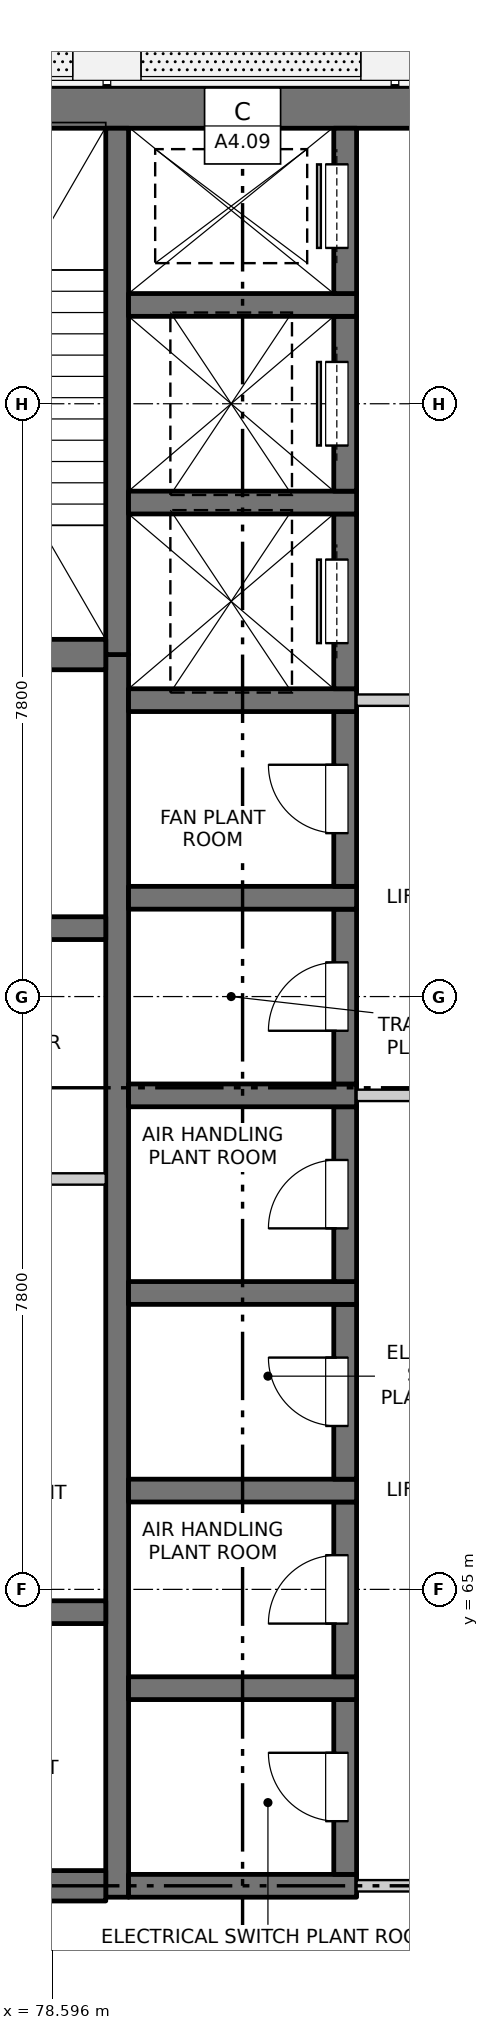
"""IFC4 building model, lengths in metres.
Left out: names, types, materials, properties, quantities, classifications, styles, units other than length and angle.
Written with IfcOpenShell. Run it as: python <this file> out.ifc"""

import sys

from ifc_helpers import new_model, si_unit, direction, frame, frame_2d, origin, place, context, subcontext, project, spatial, rectangle, extrude, element, fill, save


model = new_model("IFC4")
c1 = context("Model", 3, precision=1e-05, world=origin(), true_north=direction((0.0, 1.0)))
c2 = subcontext(c1, "Body", "Model", "MODEL_VIEW")
j1 = project(units=[si_unit("LENGTHUNIT", "METRE"), si_unit("PLANEANGLEUNIT", "RADIAN")], contexts=[c1])
p1 = place(None, origin())
s1 = spatial("IfcSite", under=j1, at=p1, CompositionType="ELEMENT")
p2 = place(p1, origin())
s2 = spatial("IfcBuilding", under=s1, at=p2, CompositionType="ELEMENT")
p3 = place(p2, frame((0.0, 0.0, 144.1)))
s3 = spatial("IfcBuildingStorey", under=s2, at=p3, CompositionType="ELEMENT", Elevation=144.1)
p4 = place(p3, frame((75.525, 84.5, -0.3), z_axis=(0.0, 0.0, 1.0), x_axis=(1.0, 0.0, 0.0)))
e1 = element("IfcWall", 1, at=p4, inside=s3, PredefinedType="SOLIDWALL", context=c2, shape_type="SweptSolid", body=[
    extrude(rectangle(XDim=18.95, YDim=0.55, at=frame_2d((9.475, 0.0))), origin(), (0.0, 0.0, 1.0), 4.5),
])
p5 = place(p3, frame((79.45, 60.95, -0.3), z_axis=(0.0, 0.0, 1.0), x_axis=(0.0, 1.0, 0.0)))
e2 = element("IfcWall", 2, at=p5, inside=s3, PredefinedType="SOLIDWALL", context=c2, shape_type="SweptSolid", body=[
    extrude(rectangle(XDim=16.35, YDim=0.3, at=frame_2d((8.175, 0.0))), origin(), (0.0, 0.0, 1.0), 4.5),
])
p6 = place(p3, frame((79.45, 77.3, -0.3), z_axis=(0.0, 0.0, 1.0), x_axis=(0.0, 1.0, 0.0)))
e3 = element("IfcWall", 3, at=p6, inside=s3, PredefinedType="SOLIDWALL", context=c2, shape_type="SweptSolid", body=[
    extrude(rectangle(XDim=6.925, YDim=0.3, at=frame_2d((3.462, 0.0))), origin(), (0.0, 0.0, 1.0), 4.5),
])
p7 = place(p3, frame((79.6, 61.1, -0.3), z_axis=(0.0, 0.0, 1.0), x_axis=(1.0, 0.0, 0.0)))
e4 = element("IfcWall", 4, at=p7, inside=s3, PredefinedType="SOLIDWALL", context=c2, shape_type="SweptSolid", body=[
    extrude(rectangle(XDim=3.0, YDim=0.3, at=frame_2d((1.5, 0.0))), origin(), (0.0, 0.0, 1.0), 4.5),
])
p8 = place(p3, frame((82.45, 61.25, -0.3), z_axis=(0.0, 0.0, 1.0), x_axis=(0.0, 1.0, 0.0)))
e5 = element("IfcWall", 5, at=p8, inside=s3, PredefinedType="SOLIDWALL", context=c2, shape_type="SweptSolid", body=[
    extrude(rectangle(XDim=2.3, YDim=0.3, at=frame_2d((1.15, 0.0))), origin(), (0.0, 0.0, 1.0), 4.5),
])
p9 = place(p8, frame((0.7, 0.0, 0.3)))
e6 = element("IfcOpeningElement", 6, at=p9, cuts=e5, PredefinedType="OPENING", context=c2, shape_type="SweptSolid", body=[
    extrude(rectangle(XDim=0.9, YDim=2.1, at=frame_2d((0.45, 1.05))), frame((0.0, 0.16, 0.0), z_axis=(0.0, -1.0, 0.0), x_axis=(1.0, 0.0, 0.0)), (0.0, 0.0, 1.0), 0.32),
])
p10 = place(p3, frame((79.6, 63.7, -0.3), z_axis=(0.0, 0.0, 1.0), x_axis=(1.0, 0.0, 0.0)))
e7 = element("IfcWall", 7, at=p10, inside=s3, PredefinedType="SOLIDWALL", context=c2, shape_type="SweptSolid", body=[
    extrude(rectangle(XDim=3.0, YDim=0.3, at=frame_2d((1.5, 0.0))), origin(), (0.0, 0.0, 1.0), 4.5),
])
p11 = place(p3, frame((82.45, 63.85, -0.3), z_axis=(0.0, 0.0, 1.0), x_axis=(0.0, 1.0, 0.0)))
e8 = element("IfcWall", 8, at=p11, inside=s3, PredefinedType="SOLIDWALL", context=c2, shape_type="SweptSolid", body=[
    extrude(rectangle(XDim=2.3, YDim=0.3, at=frame_2d((1.15, 0.0))), origin(), (0.0, 0.0, 1.0), 4.5),
])
p12 = place(p11, frame((0.7, 0.0, 0.3)))
e9 = element("IfcOpeningElement", 9, at=p12, cuts=e8, PredefinedType="OPENING", context=c2, shape_type="SweptSolid", body=[
    extrude(rectangle(XDim=0.9, YDim=2.1, at=frame_2d((0.45, 1.05))), frame((0.0, 0.16, 0.0), z_axis=(0.0, -1.0, 0.0), x_axis=(1.0, 0.0, 0.0)), (0.0, 0.0, 1.0), 0.32),
])
p13 = place(p3, frame((79.6, 66.3, -0.3), z_axis=(0.0, 0.0, 1.0), x_axis=(1.0, 0.0, 0.0)))
e10 = element("IfcWall", 10, at=p13, inside=s3, PredefinedType="SOLIDWALL", context=c2, shape_type="SweptSolid", body=[
    extrude(rectangle(XDim=3.0, YDim=0.3, at=frame_2d((1.5, 0.0))), origin(), (0.0, 0.0, 1.0), 4.5),
])
p14 = place(p3, frame((82.45, 66.45, -0.3), z_axis=(0.0, 0.0, 1.0), x_axis=(0.0, 1.0, 0.0)))
e11 = element("IfcWall", 11, at=p14, inside=s3, PredefinedType="SOLIDWALL", context=c2, shape_type="SweptSolid", body=[
    extrude(rectangle(XDim=2.3, YDim=0.3, at=frame_2d((1.15, 0.0))), origin(), (0.0, 0.0, 1.0), 4.5),
])
p15 = place(p14, frame((0.7, 0.0, 0.3)))
e12 = element("IfcOpeningElement", 12, at=p15, cuts=e11, PredefinedType="OPENING", context=c2, shape_type="SweptSolid", body=[
    extrude(rectangle(XDim=0.9, YDim=2.1, at=frame_2d((0.45, 1.05))), frame((0.0, 0.16, 0.0), z_axis=(0.0, -1.0, 0.0), x_axis=(1.0, 0.0, 0.0)), (0.0, 0.0, 1.0), 0.32),
])
p16 = place(p3, frame((79.6, 68.9, -0.3), z_axis=(0.0, 0.0, 1.0), x_axis=(1.0, 0.0, 0.0)))
e13 = element("IfcWall", 13, at=p16, inside=s3, PredefinedType="SOLIDWALL", context=c2, shape_type="SweptSolid", body=[
    extrude(rectangle(XDim=3.0, YDim=0.3, at=frame_2d((1.5, 0.0))), origin(), (0.0, 0.0, 1.0), 4.5),
])
p17 = place(p3, frame((82.45, 69.05, -0.3), z_axis=(0.0, 0.0, 1.0), x_axis=(0.0, 1.0, 0.0)))
e14 = element("IfcWall", 14, at=p17, inside=s3, PredefinedType="SOLIDWALL", context=c2, shape_type="SweptSolid", body=[
    extrude(rectangle(XDim=2.3, YDim=0.3, at=frame_2d((1.15, 0.0))), origin(), (0.0, 0.0, 1.0), 4.5),
])
p18 = place(p17, frame((0.7, 0.0, 0.3)))
e15 = element("IfcOpeningElement", 15, at=p18, cuts=e14, PredefinedType="OPENING", context=c2, shape_type="SweptSolid", body=[
    extrude(rectangle(XDim=0.9, YDim=2.1, at=frame_2d((0.45, 1.05))), frame((0.0, 0.16, 0.0), z_axis=(0.0, -1.0, 0.0), x_axis=(1.0, 0.0, 0.0)), (0.0, 0.0, 1.0), 0.32),
])
p19 = place(p3, frame((79.6, 71.5, -0.3), z_axis=(0.0, 0.0, 1.0), x_axis=(1.0, 0.0, 0.0)))
e16 = element("IfcWall", 16, at=p19, inside=s3, PredefinedType="SOLIDWALL", context=c2, shape_type="SweptSolid", body=[
    extrude(rectangle(XDim=3.0, YDim=0.3, at=frame_2d((1.5, 0.0))), origin(), (0.0, 0.0, 1.0), 4.5),
])
p20 = place(p3, frame((82.45, 71.65, -0.3), z_axis=(0.0, 0.0, 1.0), x_axis=(0.0, 1.0, 0.0)))
e17 = element("IfcWall", 17, at=p20, inside=s3, PredefinedType="SOLIDWALL", context=c2, shape_type="SweptSolid", body=[
    extrude(rectangle(XDim=2.3, YDim=0.3, at=frame_2d((1.15, 0.0))), origin(), (0.0, 0.0, 1.0), 4.5),
])
p21 = place(p20, frame((0.7, 0.0, 0.3)))
e18 = element("IfcOpeningElement", 18, at=p21, cuts=e17, PredefinedType="OPENING", context=c2, shape_type="SweptSolid", body=[
    extrude(rectangle(XDim=0.9, YDim=2.1, at=frame_2d((0.45, 1.05))), frame((0.0, 0.16, 0.0), z_axis=(0.0, -1.0, 0.0), x_axis=(1.0, 0.0, 0.0)), (0.0, 0.0, 1.0), 0.32),
])
p22 = place(p3, frame((79.6, 74.1, -0.3), z_axis=(0.0, 0.0, 1.0), x_axis=(1.0, 0.0, 0.0)))
e19 = element("IfcWall", 19, at=p22, inside=s3, PredefinedType="SOLIDWALL", context=c2, shape_type="SweptSolid", body=[
    extrude(rectangle(XDim=3.0, YDim=0.3, at=frame_2d((1.5, 0.0))), origin(), (0.0, 0.0, 1.0), 4.5),
])
p23 = place(p3, frame((82.45, 74.25, -0.3), z_axis=(0.0, 0.0, 1.0), x_axis=(0.0, 1.0, 0.0)))
e20 = element("IfcWall", 20, at=p23, inside=s3, PredefinedType="SOLIDWALL", context=c2, shape_type="SweptSolid", body=[
    extrude(rectangle(XDim=2.3, YDim=0.3, at=frame_2d((1.15, 0.0))), origin(), (0.0, 0.0, 1.0), 4.5),
])
p24 = place(p23, frame((0.7, 0.0, 0.3)))
e21 = element("IfcOpeningElement", 21, at=p24, cuts=e20, PredefinedType="OPENING", context=c2, shape_type="SweptSolid", body=[
    extrude(rectangle(XDim=0.9, YDim=2.1, at=frame_2d((0.45, 1.05))), frame((0.0, 0.16, 0.0), z_axis=(0.0, -1.0, 0.0), x_axis=(1.0, 0.0, 0.0)), (0.0, 0.0, 1.0), 0.32),
])
p25 = place(p3, frame((79.6, 76.7, -0.3), z_axis=(0.0, 0.0, 1.0), x_axis=(1.0, 0.0, 0.0)))
e22 = element("IfcWall", 22, at=p25, inside=s3, PredefinedType="SOLIDWALL", context=c2, shape_type="SweptSolid", body=[
    extrude(rectangle(XDim=3.0, YDim=0.3, at=frame_2d((1.5, 0.0))), origin(), (0.0, 0.0, 1.0), 4.5),
])
p26 = place(p3, frame((82.45, 76.85, -0.3), z_axis=(0.0, 0.0, 1.0), x_axis=(0.0, 1.0, 0.0)))
e23 = element("IfcWall", 23, at=p26, inside=s3, PredefinedType="SOLIDWALL", context=c2, shape_type="SweptSolid", body=[
    extrude(rectangle(XDim=2.3, YDim=0.3, at=frame_2d((1.15, 0.0))), origin(), (0.0, 0.0, 1.0), 4.5),
])
p27 = place(p26, frame((0.6, 0.0, 0.3)))
e24 = element("IfcOpeningElement", 24, at=p27, cuts=e23, PredefinedType="OPENING", context=c2, shape_type="SweptSolid", body=[
    extrude(rectangle(XDim=1.1, YDim=2.1, at=frame_2d((0.55, 1.05))), frame((0.0, 0.16, 0.0), z_axis=(0.0, -1.0, 0.0), x_axis=(1.0, 0.0, 0.0)), (0.0, 0.0, 1.0), 0.32),
])
p28 = place(p3, frame((79.6, 79.3, -0.3), z_axis=(0.0, 0.0, 1.0), x_axis=(1.0, 0.0, 0.0)))
e25 = element("IfcWall", 25, at=p28, inside=s3, PredefinedType="SOLIDWALL", context=c2, shape_type="SweptSolid", body=[
    extrude(rectangle(XDim=3.0, YDim=0.3, at=frame_2d((1.5, 0.0))), origin(), (0.0, 0.0, 1.0), 4.5),
])
p29 = place(p3, frame((82.45, 79.45, -0.3), z_axis=(0.0, 0.0, 1.0), x_axis=(0.0, 1.0, 0.0)))
e26 = element("IfcWall", 26, at=p29, inside=s3, PredefinedType="SOLIDWALL", context=c2, shape_type="SweptSolid", body=[
    extrude(rectangle(XDim=2.3, YDim=0.3, at=frame_2d((1.15, 0.0))), origin(), (0.0, 0.0, 1.0), 4.5),
])
p30 = place(p29, frame((0.6, 0.0, 0.3)))
e27 = element("IfcOpeningElement", 27, at=p30, cuts=e26, PredefinedType="OPENING", context=c2, shape_type="SweptSolid", body=[
    extrude(rectangle(XDim=1.1, YDim=2.1, at=frame_2d((0.55, 1.05))), frame((0.0, 0.16, 0.0), z_axis=(0.0, -1.0, 0.0), x_axis=(1.0, 0.0, 0.0)), (0.0, 0.0, 1.0), 0.32),
])
p31 = place(p3, frame((79.6, 81.9, -0.3), z_axis=(0.0, 0.0, 1.0), x_axis=(1.0, 0.0, 0.0)))
e28 = element("IfcWall", 28, at=p31, inside=s3, PredefinedType="SOLIDWALL", context=c2, shape_type="SweptSolid", body=[
    extrude(rectangle(XDim=3.0, YDim=0.3, at=frame_2d((1.5, 0.0))), origin(), (0.0, 0.0, 1.0), 4.5),
])
p32 = place(p3, frame((82.45, 82.05, -0.3), z_axis=(0.0, 0.0, 1.0), x_axis=(0.0, 1.0, 0.0)))
e29 = element("IfcWall", 29, at=p32, inside=s3, PredefinedType="SOLIDWALL", context=c2, shape_type="SweptSolid", body=[
    extrude(rectangle(XDim=2.175, YDim=0.3, at=frame_2d((1.087, 0.0))), origin(), (0.0, 0.0, 1.0), 4.5),
])
p33 = place(p32, frame((0.6, 0.0, 0.3)))
e30 = element("IfcOpeningElement", 30, at=p33, cuts=e29, PredefinedType="OPENING", context=c2, shape_type="SweptSolid", body=[
    extrude(rectangle(XDim=1.1, YDim=2.1, at=frame_2d((0.55, 1.05))), frame((0.0, 0.16, 0.0), z_axis=(0.0, -1.0, 0.0), x_axis=(1.0, 0.0, 0.0)), (0.0, 0.0, 1.0), 0.32),
])
p34 = place(p3, frame((75.525, 61.1, -0.3), z_axis=(0.0, 0.0, 1.0), x_axis=(1.0, 0.0, 0.0)))
e31 = element("IfcWall", 31, at=p34, inside=s3, PredefinedType="SOLIDWALL", context=c2, shape_type="SweptSolid", body=[
    extrude(rectangle(XDim=3.775, YDim=0.4, at=frame_2d((1.888, 0.0))), origin(), (0.0, 0.0, 1.0), 4.5),
])
for number, where, z_axis, x_axis in (
    (32, (75.525, 64.7, -0.3), (0.0, 0.0, 1.0), (1.0, 0.0, 0.0)),
    (33, (75.525, 73.7, -0.3), (0.0, 0.0, 1.0), (1.0, 0.0, 0.0)),
):
    element("IfcWall", number, at=place(p3, frame(where, z_axis=z_axis, x_axis=x_axis)), inside=s3, PredefinedType="SOLIDWALL", context=c2, shape_type="SweptSolid", body=[
        extrude(rectangle(XDim=3.775, YDim=0.3, at=frame_2d((1.888, 0.0))), origin(), (0.0, 0.0, 1.0), 4.5),
    ])
p35 = place(p3, frame((75.525, 77.3, -0.3), z_axis=(0.0, 0.0, 1.0), x_axis=(1.0, 0.0, 0.0)))
e34 = element("IfcWall", 34, at=p35, inside=s3, PredefinedType="SOLIDWALL", context=c2, shape_type="SweptSolid", body=[
    extrude(rectangle(XDim=3.775, YDim=0.4, at=frame_2d((1.888, 0.0))), origin(), (0.0, 0.0, 1.0), 4.5),
])
p36 = place(p3, frame((82.6, 61.1, 0.0), z_axis=(0.0, 0.0, 1.0), x_axis=(1.0, 0.0, 0.0)))
e35 = element("IfcWall", 35, at=p36, inside=s3, PredefinedType="PARTITIONING", context=c2, shape_type="SweptSolid", body=[
    extrude(rectangle(XDim=4.8, YDim=0.15, at=frame_2d((2.4, 0.0))), origin(), (0.0, 0.0, 1.0), 4.2),
])
p37 = place(p36, frame((1.5, 0.0, 0.0)))
e36 = element("IfcOpeningElement", 36, at=p37, cuts=e35, PredefinedType="OPENING", context=c2, shape_type="SweptSolid", body=[
    extrude(rectangle(XDim=1.8, YDim=2.1, at=frame_2d((0.9, 1.05))), frame((0.0, 0.085, 0.0), z_axis=(0.0, -1.0, 0.0), x_axis=(1.0, 0.0, 0.0)), (0.0, 0.0, 1.0), 0.17),
])
p38 = place(p3, frame((75.525, 70.4, 0.0), z_axis=(0.0, 0.0, 1.0), x_axis=(1.0, 0.0, 0.0)))
e37 = element("IfcWall", 37, at=p38, inside=s3, PredefinedType="PARTITIONING", context=c2, shape_type="SweptSolid", body=[
    extrude(rectangle(XDim=3.775, YDim=0.15, at=frame_2d((1.887, 0.0))), origin(), (0.0, 0.0, 1.0), 4.2),
])
p39 = place(p3, frame((82.6, 71.5, 0.0), z_axis=(0.0, 0.0, 1.0), x_axis=(1.0, 0.0, 0.0)))
e38 = element("IfcWall", 38, at=p39, inside=s3, PredefinedType="PARTITIONING", context=c2, shape_type="SweptSolid", body=[
    extrude(rectangle(XDim=4.8, YDim=0.15, at=frame_2d((2.4, 0.0))), origin(), (0.0, 0.0, 1.0), 4.2),
])
p40 = place(p39, frame((1.5, 0.0, 0.0)))
e39 = element("IfcOpeningElement", 39, at=p40, cuts=e38, PredefinedType="OPENING", context=c2, shape_type="SweptSolid", body=[
    extrude(rectangle(XDim=1.8, YDim=2.1, at=frame_2d((0.9, 1.05))), frame((0.0, 0.085, 0.0), z_axis=(0.0, -1.0, 0.0), x_axis=(1.0, 0.0, 0.0)), (0.0, 0.0, 1.0), 0.17),
])
p41 = place(p3, frame((82.6, 76.7, 0.0), z_axis=(0.0, 0.0, 1.0), x_axis=(1.0, 0.0, 0.0)))
e40 = element("IfcWall", 40, at=p41, inside=s3, PredefinedType="PARTITIONING", context=c2, shape_type="SweptSolid", body=[
    extrude(rectangle(XDim=4.8, YDim=0.15, at=frame_2d((2.4, 0.0))), origin(), (0.0, 0.0, 1.0), 4.2),
])
p42 = place(p41, frame((1.5, 0.0, 0.0)))
e41 = element("IfcOpeningElement", 41, at=p42, cuts=e40, PredefinedType="OPENING", context=c2, shape_type="SweptSolid", body=[
    extrude(rectangle(XDim=1.8, YDim=2.1, at=frame_2d((0.9, 1.05))), frame((0.0, 0.085, 0.0), z_axis=(0.0, -1.0, 0.0), x_axis=(1.0, 0.0, 0.0)), (0.0, 0.0, 1.0), 0.17),
])
p43 = place(p9, origin())
e42 = element("IfcDoor", 42, at=p43, inside=s3, OperationType="SINGLE_SWING_RIGHT", PredefinedType="DOOR", context=c2, shape_type="SweptSolid", body=[
    extrude(rectangle(XDim=0.9, YDim=2.1, at=frame_2d((0.45, 1.05))), frame((0.0, 0.135, 0.0), z_axis=(0.0, -1.0, 0.0), x_axis=(1.0, 0.0, 0.0)), (0.0, 0.0, 1.0), 0.05),
])
fill(e6, e42)
p44 = place(p12, origin())
e43 = element("IfcDoor", 43, at=p44, inside=s3, OperationType="SINGLE_SWING_LEFT", PredefinedType="DOOR", context=c2, shape_type="SweptSolid", body=[
    extrude(rectangle(XDim=0.9, YDim=2.1, at=frame_2d((0.45, 1.05))), frame((0.0, 0.135, 0.0), z_axis=(0.0, -1.0, 0.0), x_axis=(1.0, 0.0, 0.0)), (0.0, 0.0, 1.0), 0.05),
])
fill(e9, e43)
p45 = place(p15, origin())
e44 = element("IfcDoor", 44, at=p45, inside=s3, OperationType="SINGLE_SWING_RIGHT", PredefinedType="DOOR", context=c2, shape_type="SweptSolid", body=[
    extrude(rectangle(XDim=0.9, YDim=2.1, at=frame_2d((0.45, 1.05))), frame((0.0, 0.135, 0.0), z_axis=(0.0, -1.0, 0.0), x_axis=(1.0, 0.0, 0.0)), (0.0, 0.0, 1.0), 0.05),
])
fill(e12, e44)
p46 = place(p18, origin())
e45 = element("IfcDoor", 45, at=p46, inside=s3, OperationType="SINGLE_SWING_LEFT", PredefinedType="DOOR", context=c2, shape_type="SweptSolid", body=[
    extrude(rectangle(XDim=0.9, YDim=2.1, at=frame_2d((0.45, 1.05))), frame((0.0, 0.135, 0.0), z_axis=(0.0, -1.0, 0.0), x_axis=(1.0, 0.0, 0.0)), (0.0, 0.0, 1.0), 0.05),
])
fill(e15, e45)
p47 = place(p21, origin())
e46 = element("IfcDoor", 46, at=p47, inside=s3, OperationType="SINGLE_SWING_LEFT", PredefinedType="DOOR", context=c2, shape_type="SweptSolid", body=[
    extrude(rectangle(XDim=0.9, YDim=2.1, at=frame_2d((0.45, 1.05))), frame((0.0, 0.135, 0.0), z_axis=(0.0, -1.0, 0.0), x_axis=(1.0, 0.0, 0.0)), (0.0, 0.0, 1.0), 0.05),
])
fill(e18, e46)
p48 = place(p24, origin())
e47 = element("IfcDoor", 47, at=p48, inside=s3, OperationType="SINGLE_SWING_RIGHT", PredefinedType="DOOR", context=c2, shape_type="SweptSolid", body=[
    extrude(rectangle(XDim=0.9, YDim=2.1, at=frame_2d((0.45, 1.05))), frame((0.0, 0.135, 0.0), z_axis=(0.0, -1.0, 0.0), x_axis=(1.0, 0.0, 0.0)), (0.0, 0.0, 1.0), 0.05),
])
fill(e21, e47)
p49 = place(p27, origin())
e48 = element("IfcDoor", 48, at=p49, inside=s3, OperationType="SLIDING_TO_LEFT", PredefinedType="DOOR", context=c2, shape_type="SweptSolid", body=[
    extrude(rectangle(XDim=1.1, YDim=2.1, at=frame_2d((0.55, 1.05))), frame((0.0, 0.135, 0.0), z_axis=(0.0, -1.0, 0.0), x_axis=(1.0, 0.0, 0.0)), (0.0, 0.0, 1.0), 0.05),
])
fill(e24, e48)
p50 = place(p30, origin())
e49 = element("IfcDoor", 49, at=p50, inside=s3, OperationType="SLIDING_TO_LEFT", PredefinedType="DOOR", context=c2, shape_type="SweptSolid", body=[
    extrude(rectangle(XDim=1.1, YDim=2.1, at=frame_2d((0.55, 1.05))), frame((0.0, 0.135, 0.0), z_axis=(0.0, -1.0, 0.0), x_axis=(1.0, 0.0, 0.0)), (0.0, 0.0, 1.0), 0.05),
])
fill(e27, e49)
p51 = place(p33, origin())
e50 = element("IfcDoor", 50, at=p51, inside=s3, OperationType="SLIDING_TO_RIGHT", PredefinedType="DOOR", context=c2, shape_type="SweptSolid", body=[
    extrude(rectangle(XDim=1.1, YDim=2.1, at=frame_2d((0.55, 1.05))), frame((0.0, 0.135, 0.0), z_axis=(0.0, -1.0, 0.0), x_axis=(1.0, 0.0, 0.0)), (0.0, 0.0, 1.0), 0.05),
])
fill(e30, e50)
save(model, sys.argv[1])
